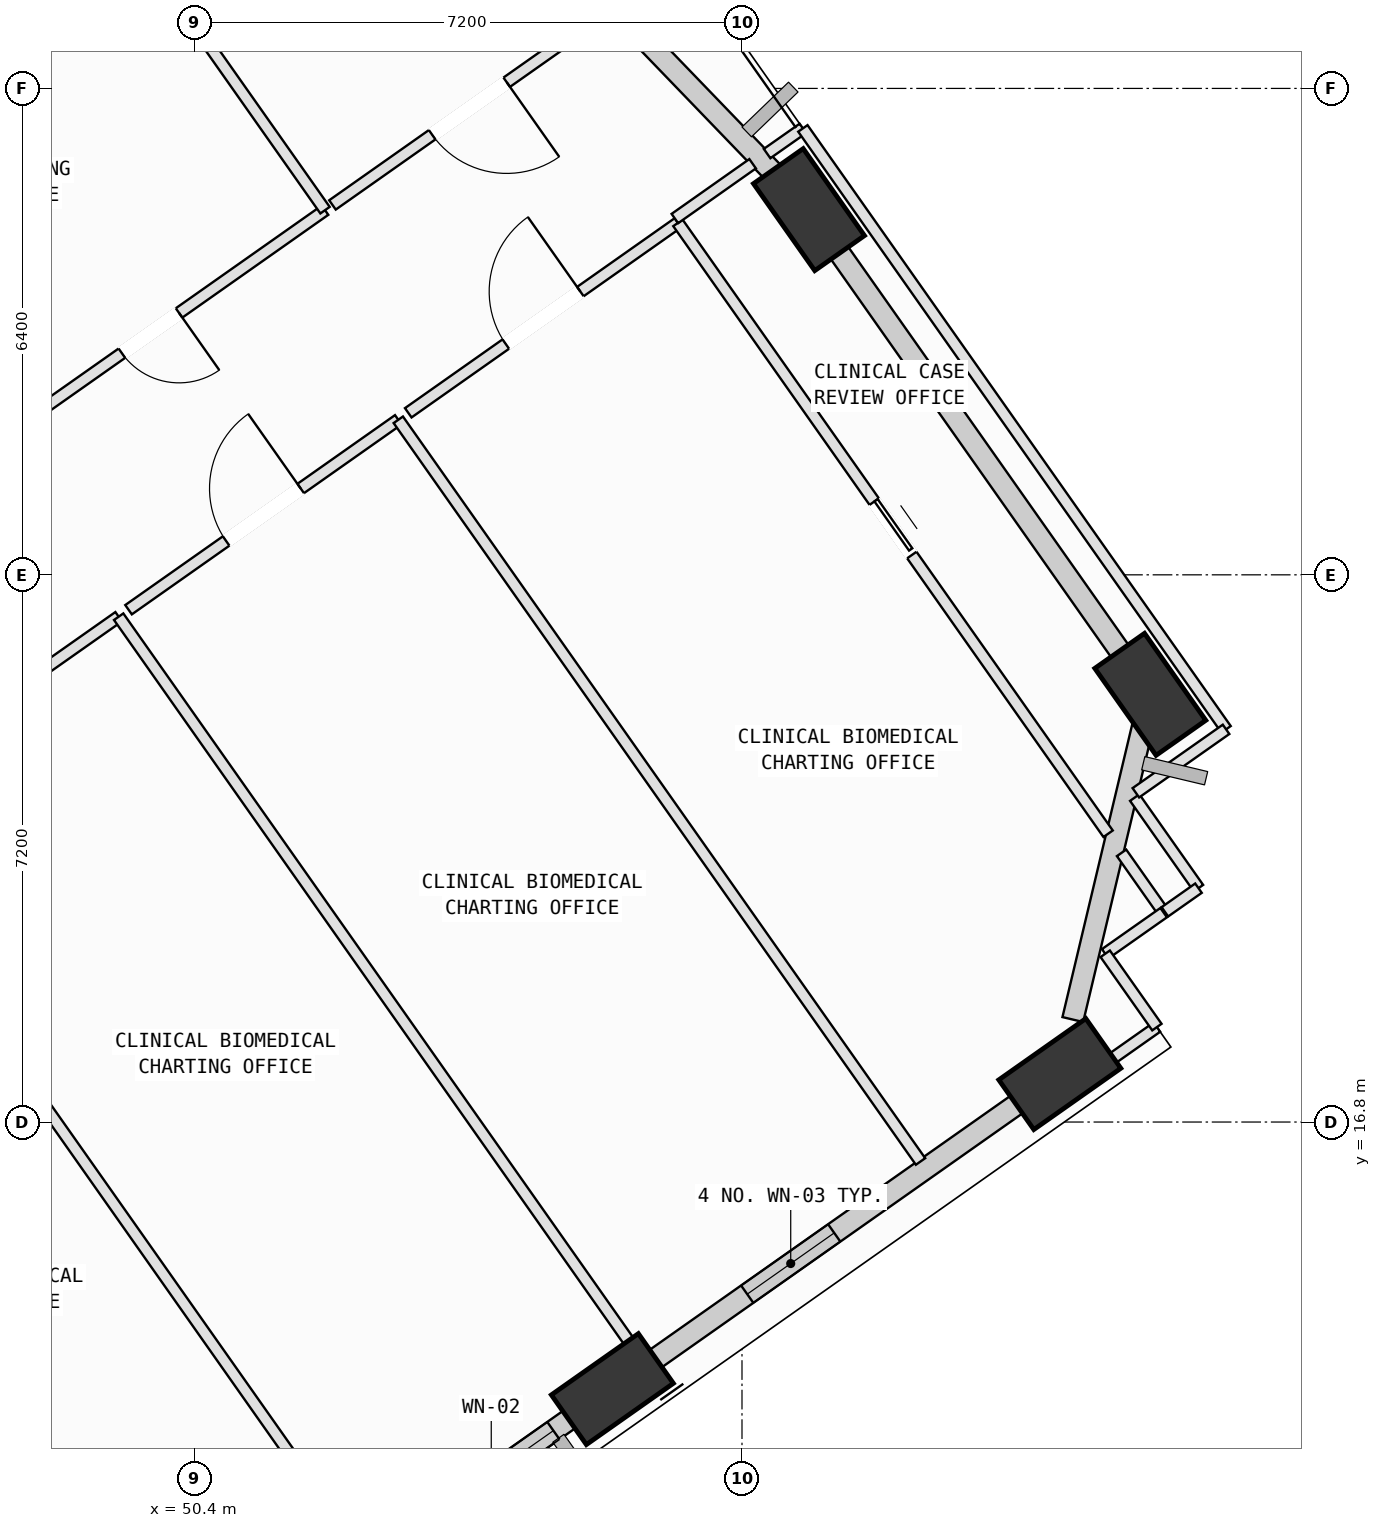
"""IFC4 building model, lengths in metres.
Left out: names, types, materials, properties, quantities, classifications, styles, units other than length and angle.
Written with IfcOpenShell. Run it as: python <this file> out.ifc"""

import sys

from ifc_helpers import new_model, si_unit, direction, frame, frame_2d, origin, origin_2d, place, context, subcontext, project, spatial, rectangle, extrude, element, fill, save


model = new_model("IFC4")
c1 = context("Model", 3, precision=1e-05, world=origin(), true_north=direction((0.0, 1.0)))
c2 = subcontext(c1, "Body", "Model", "MODEL_VIEW")
j1 = project(units=[si_unit("LENGTHUNIT", "METRE"), si_unit("PLANEANGLEUNIT", "RADIAN")], contexts=[c1])
p1 = place(None, origin())
s1 = spatial("IfcSite", under=j1, at=p1, CompositionType="ELEMENT")
p2 = place(p1, origin())
s2 = spatial("IfcBuilding", under=s1, at=p2, CompositionType="ELEMENT")
p3 = place(p2, frame((0.0, 0.0, 173.8)))
s3 = spatial("IfcBuildingStorey", under=s2, at=p3, CompositionType="ELEMENT", Elevation=173.8)
p4 = place(p3, frame((55.895, 13.286, 0.002), z_axis=(0.046726970601, 0.092299438677, 0.994634306586), x_axis=(-0.988133036877, -0.141582839923, 0.059560061042)))
e1 = element("IfcColumn", 1, at=p4, inside=s3, PredefinedType="COLUMN", context=c2, shape_type="SweptSolid", body=[
    extrude(rectangle(XDim=1.4, YDim=0.8, at=origin_2d()), origin(), (0.0, 0.0, 1.0), 4.018),
])
p5 = place(p3, frame((61.781, 17.431, 0.002), z_axis=(0.029354934383, 0.116206723713, 0.992791158901), x_axis=(-0.932731987806, -0.353906045006, 0.069003987069)))
e2 = element("IfcColumn", 2, at=p5, inside=s3, PredefinedType="COLUMN", context=c2, shape_type="SweptSolid", body=[
    extrude(rectangle(XDim=1.4, YDim=0.8, at=origin_2d()), origin(), (0.0, 0.0, 1.0), 4.025),
])
p6 = place(p3, frame((62.972, 22.427, 0.002), z_axis=(0.00879280202, 0.120976827791, 0.992616388022), x_axis=(0.515370311982, -0.851209314245, 0.099177340502)))
e3 = element("IfcColumn", 3, at=p6, inside=s3, PredefinedType="COLUMN", context=c2, shape_type="SweptSolid", body=[
    extrude(rectangle(XDim=1.4, YDim=0.8, at=origin_2d()), origin(), (0.0, 0.0, 1.0), 4.026),
])
p7 = place(p3, frame((58.481, 28.805, 0.002), z_axis=(-0.017377477676, 0.102442053714, 0.994587175114), x_axis=(0.703616146973, -0.705483127216, 0.084958077495)))
e4 = element("IfcColumn", 4, at=p7, inside=s3, PredefinedType="COLUMN", context=c2, shape_type="SweptSolid", body=[
    extrude(rectangle(XDim=1.4, YDim=0.8, at=origin_2d()), origin(), (0.0, 0.0, 1.0), 4.018),
])
p8 = place(p3, frame((55.647, 13.111, 0.0), z_axis=(0.0, 0.0, 1.0), x_axis=(-0.817651715205, -0.575713186077, 0.0)))
e5 = element("IfcWall", 5, at=p8, inside=s3, PredefinedType="SOLIDWALL", context=c2, shape_type="SweptSolid", body=[
    extrude(rectangle(XDim=6.218, YDim=0.28, at=frame_2d((3.109, 0.0))), origin(), (0.0, 0.0, 1.0), 3.265),
])
p9 = place(p8, frame((0.646, 0.0, 0.75)))
e6 = element("IfcOpeningElement", 6, at=p9, cuts=e5, PredefinedType="OPENING", context=c2, shape_type="SweptSolid", body=[
    extrude(rectangle(XDim=2.0, YDim=1.95, at=frame_2d((1.0, 0.975))), frame((0.0, 0.15, 0.0), z_axis=(0.0, -1.0, 0.0), x_axis=(1.0, 0.0, 0.0)), (0.0, 0.0, 1.0), 0.3),
])
p10 = place(p3, frame((61.546, 17.265, 0.0), z_axis=(0.0, 0.0, 1.0), x_axis=(-0.817633903832, -0.575738481695, 0.0)))
e7 = element("IfcWall", 7, at=p10, inside=s3, PredefinedType="SOLIDWALL", context=c2, shape_type="SweptSolid", body=[
    extrude(rectangle(XDim=6.242, YDim=0.28, at=frame_2d((3.121, 0.0))), origin(), (0.0, 0.0, 1.0), 3.265),
])
p11 = place(p10, frame((3.343, 0.0, 0.75)))
e8 = element("IfcOpeningElement", 8, at=p11, cuts=e7, PredefinedType="OPENING", context=c2, shape_type="SweptSolid", body=[
    extrude(rectangle(XDim=1.4, YDim=1.85, at=frame_2d((0.7, 0.925))), frame((0.0, 0.15, 0.0), z_axis=(0.0, -1.0, 0.0), x_axis=(1.0, 0.0, 0.0)), (0.0, 0.0, 1.0), 0.3),
])
p12 = place(p3, frame((62.913, 22.181, 0.0), z_axis=(0.0, 0.0, 1.0), x_axis=(-0.231822241408, -0.972758165419, 0.0)))
e9 = element("IfcWall", 9, at=p12, inside=s3, PredefinedType="SOLIDWALL", context=c2, shape_type="SweptSolid", body=[
    extrude(rectangle(XDim=4.145, YDim=0.28, at=frame_2d((2.073, 0.0))), origin(), (0.0, 0.0, 1.0), 3.265),
])
p13 = place(p3, frame((58.654, 28.56, 0.0), z_axis=(0.0, 0.0, 1.0), x_axis=(0.575721488914, -0.817645869067, 0.0)))
e10 = element("IfcWall", 10, at=p13, inside=s3, PredefinedType="SOLIDWALL", context=c2, shape_type="SweptSolid", body=[
    extrude(rectangle(XDim=6.84, YDim=0.28, at=frame_2d((3.42, 0.0))), origin(), (0.0, 0.0, 1.0), 3.265),
])
p14 = place(p3, frame((51.895, 35.64, 0.0), z_axis=(0.0, 0.0, 1.0), x_axis=(0.693919284299, -0.720052794508, 0.0)))
e11 = element("IfcWall", 11, at=p14, inside=s3, PredefinedType="SOLIDWALL", context=c2, shape_type="SweptSolid", body=[
    extrude(rectangle(XDim=8.838, YDim=0.28, at=frame_2d((4.419, 0.0))), origin(), (0.0, 0.0, 1.0), 3.265),
])
p15 = place(p3, frame((42.04, 18.268, 0.0), z_axis=(0.0, 0.0, 1.0), x_axis=(0.575682896217, -0.817673041627, 0.0)))
e12 = element("IfcWall", 12, at=p15, inside=s3, PredefinedType="PARTITIONING", context=c2, shape_type="SweptSolid", body=[
    extrude(rectangle(XDim=11.935, YDim=0.15, at=frame_2d((5.968, 0.0))), origin(), (0.0, 0.0, 1.0), 3.78),
])
p16 = place(p3, frame((45.719, 20.858, 0.0), z_axis=(0.0, 0.0, 1.0), x_axis=(0.575744719848, -0.817629511189, 0.0)))
e13 = element("IfcWall", 13, at=p16, inside=s3, PredefinedType="PARTITIONING", context=c2, shape_type="SweptSolid", body=[
    extrude(rectangle(XDim=11.934, YDim=0.15, at=frame_2d((5.967, 0.0))), origin(), (0.0, 0.0, 1.0), 3.78),
])
p17 = place(p3, frame((45.85, 20.951, 0.0), z_axis=(0.0, 0.0, 1.0), x_axis=(0.817727963856, 0.575604879346, 0.0)))
e14 = element("IfcWall", 14, at=p17, inside=s3, PredefinedType="PARTITIONING", context=c2, shape_type="SweptSolid", body=[
    extrude(rectangle(XDim=4.34, YDim=0.15, at=frame_2d((2.17, 0.0))), origin(), (0.0, 0.0, 1.0), 3.78),
])
p18 = place(p17, frame((1.57, 0.0, 0.0)))
e15 = element("IfcOpeningElement", 15, at=p18, cuts=e14, PredefinedType="OPENING", context=c2, shape_type="SweptSolid", body=[
    extrude(rectangle(XDim=1.2, YDim=2.15, at=frame_2d((0.6, 1.075))), frame((0.0, 0.085, 0.0), z_axis=(0.0, -1.0, 0.0), x_axis=(1.0, 0.0, 0.0)), (0.0, 0.0, 1.0), 0.17),
])
p19 = place(p3, frame((49.399, 23.449, 0.0), z_axis=(0.0, 0.0, 1.0), x_axis=(0.575704672979, -0.817657709259, 0.0)))
e16 = element("IfcWall", 16, at=p19, inside=s3, PredefinedType="PARTITIONING", context=c2, shape_type="SweptSolid", body=[
    extrude(rectangle(XDim=12.279, YDim=0.15, at=frame_2d((6.14, 0.0))), origin(), (0.0, 0.0, 1.0), 3.78),
])
p20 = place(p3, frame((56.468, 13.409, 0.0), z_axis=(0.0, 0.0, 1.0), x_axis=(-0.817786213284, -0.575522118917, 0.0)))
e17 = element("IfcWall", 17, at=p20, inside=s3, PredefinedType="PARTITIONING", context=c2, shape_type="SweptSolid", body=[
    extrude(rectangle(XDim=0.843, YDim=0.15, at=frame_2d((0.421, 0.0))), origin(), (0.0, 0.0, 1.0), 3.265),
])
p21 = place(p3, frame((49.529, 23.541, 0.0), z_axis=(0.0, 0.0, 1.0), x_axis=(0.81762204879, 0.575755317241, 0.0)))
e18 = element("IfcWall", 18, at=p21, inside=s3, PredefinedType="PARTITIONING", context=c2, shape_type="SweptSolid", body=[
    extrude(rectangle(XDim=4.34, YDim=0.15, at=frame_2d((2.17, 0.0))), origin(), (0.0, 0.0, 1.0), 3.065),
])
p22 = place(p21, frame((1.57, 0.0, 0.0)))
e19 = element("IfcOpeningElement", 19, at=p22, cuts=e18, PredefinedType="OPENING", context=c2, shape_type="SweptSolid", body=[
    extrude(rectangle(XDim=1.2, YDim=2.15, at=frame_2d((0.6, 1.075))), frame((0.0, 0.085, 0.0), z_axis=(0.0, -1.0, 0.0), x_axis=(1.0, 0.0, 0.0)), (0.0, 0.0, 1.0), 0.17),
])
p23 = place(p3, frame((53.078, 26.04, 0.0), z_axis=(0.0, 0.0, 1.0), x_axis=(0.575696572392, -0.817663412742, 0.0)))
e20 = element("IfcWall", 20, at=p23, inside=s3, PredefinedType="PARTITIONING", context=c2, shape_type="SweptSolid", body=[
    extrude(rectangle(XDim=11.935, YDim=0.15, at=frame_2d((5.968, 0.0))), origin(), (0.0, 0.0, 1.0), 3.78),
])
p24 = place(p3, frame((63.059, 18.049, 0.0), z_axis=(0.0, 0.0, 1.0), x_axis=(-0.817536593358, -0.575876652176, 0.0)))
e21 = element("IfcWall", 21, at=p24, inside=s3, PredefinedType="PARTITIONING", context=c2, shape_type="SweptSolid", body=[
    extrude(rectangle(XDim=1.688, YDim=0.15, at=frame_2d((0.844, 0.0))), origin(), (0.0, 0.0, 1.0), 3.78),
])
p25 = place(p3, frame((53.209, 26.132, 0.0), z_axis=(0.0, 0.0, 1.0), x_axis=(0.817566099481, 0.575834761872, 0.0)))
e22 = element("IfcWall", 22, at=p25, inside=s3, PredefinedType="PARTITIONING", context=c2, shape_type="SweptSolid", body=[
    extrude(rectangle(XDim=4.34, YDim=0.15, at=frame_2d((2.17, 0.0))), origin(), (0.0, 0.0, 1.0), 3.065),
])
p26 = place(p25, frame((1.57, 0.0, 0.0)))
e23 = element("IfcOpeningElement", 23, at=p26, cuts=e22, PredefinedType="OPENING", context=c2, shape_type="SweptSolid", body=[
    extrude(rectangle(XDim=1.2, YDim=2.15, at=frame_2d((0.6, 1.075))), frame((0.0, 0.085, 0.0), z_axis=(0.0, -1.0, 0.0), x_axis=(1.0, 0.0, 0.0)), (0.0, 0.0, 1.0), 0.17),
])
p27 = place(p3, frame((56.757, 28.631, 0.0), z_axis=(0.0, 0.0, 1.0), x_axis=(0.575730217861, -0.817639722764, 0.0)))
e24 = element("IfcWall", 24, at=p27, inside=s3, PredefinedType="PARTITIONING", context=c2, shape_type="SweptSolid", body=[
    extrude(rectangle(XDim=9.831, YDim=0.15, at=frame_2d((4.916, 0.0))), origin(), (0.0, 0.0, 1.0), 3.78),
])
p28 = place(p27, frame((4.485, 0.0, 0.0)))
e25 = element("IfcOpeningElement", 25, at=p28, cuts=e24, PredefinedType="OPENING", context=c2, shape_type="SweptSolid", body=[
    extrude(rectangle(XDim=0.86, YDim=2.06, at=frame_2d((0.43, 1.03))), frame((0.0, 0.085, 0.0), z_axis=(0.0, -1.0, 0.0), x_axis=(1.0, 0.0, 0.0)), (0.0, 0.0, 1.0), 0.17),
])
p29 = place(p3, frame((62.594, 20.342, 0.0), z_axis=(0.0, 0.0, 1.0), x_axis=(0.575537387279, -0.817775467866, 0.0)))
e26 = element("IfcWall", 26, at=p29, inside=s3, PredefinedType="PARTITIONING", context=c2, shape_type="SweptSolid", body=[
    extrude(rectangle(XDim=0.962, YDim=0.15, at=frame_2d((0.481, 0.0))), origin(), (0.0, 0.0, 1.0), 3.78),
])
p30 = place(p3, frame((63.148, 19.555, 0.0), z_axis=(0.0, 0.0, 1.0), x_axis=(-0.817887878313, -0.57537763122, 0.0)))
e27 = element("IfcWall", 27, at=p30, inside=s3, PredefinedType="PARTITIONING", context=c2, shape_type="SweptSolid", body=[
    extrude(rectangle(XDim=0.94, YDim=0.15, at=frame_2d((0.47, 0.0))), origin(), (0.0, 0.0, 1.0), 3.78),
])
p31 = place(p3, frame((62.379, 19.014, 0.0), z_axis=(0.0, 0.0, 1.0), x_axis=(0.576179669195, -0.817323062691, 0.0)))
e28 = element("IfcWall", 28, at=p31, inside=s3, PredefinedType="PARTITIONING", context=c2, shape_type="SweptSolid", body=[
    extrude(rectangle(XDim=1.18, YDim=0.15, at=frame_2d((0.59, 0.0))), origin(), (0.0, 0.0, 1.0), 3.78),
])
p32 = place(p3, frame((52.114, 28.798, 0.0), z_axis=(0.0, 0.0, 1.0), x_axis=(-0.817638200952, -0.5757323791, 0.0)))
e29 = element("IfcWall", 29, at=p32, inside=s3, PredefinedType="PARTITIONING", context=c2, shape_type="SweptSolid", body=[
    extrude(rectangle(XDim=5.617, YDim=0.15, at=frame_2d((2.809, 0.0))), origin(), (0.0, 0.0, 1.0), 3.78),
])
p33 = place(p32, frame((2.349, 0.0, 0.0)))
e30 = element("IfcOpeningElement", 30, at=p33, cuts=e29, PredefinedType="OPENING", context=c2, shape_type="SweptSolid", body=[
    extrude(rectangle(XDim=0.92, YDim=2.1, at=frame_2d((0.46, 1.05))), frame((0.0, 0.085, 0.0), z_axis=(0.0, -1.0, 0.0), x_axis=(1.0, 0.0, 0.0)), (0.0, 0.0, 1.0), 0.17),
])
p34 = place(p3, frame((48.703, 33.642, 0.0), z_axis=(0.0, 0.0, 1.0), x_axis=(0.575763875757, -0.817616021965, 0.0)))
e31 = element("IfcWall", 31, at=p34, inside=s3, PredefinedType="PARTITIONING", context=c2, shape_type="SweptSolid", body=[
    extrude(rectangle(XDim=5.925, YDim=0.15, at=frame_2d((2.962, 0.0))), origin(), (0.0, 0.0, 1.0), 3.78),
])
p35 = place(p3, frame((55.816, 31.405, 0.0), z_axis=(0.0, 0.0, 1.0), x_axis=(-0.817599763691, -0.575786962697, 0.0)))
e32 = element("IfcWall", 32, at=p35, inside=s3, PredefinedType="PARTITIONING", context=c2, shape_type="SweptSolid", body=[
    extrude(rectangle(XDim=4.408, YDim=0.15, at=frame_2d((2.204, 0.0))), origin(), (0.0, 0.0, 1.0), 3.78),
])
p36 = place(p35, frame((1.604, 0.0, 0.0)))
e33 = element("IfcOpeningElement", 33, at=p36, cuts=e32, PredefinedType="OPENING", context=c2, shape_type="SweptSolid", body=[
    extrude(rectangle(XDim=1.2, YDim=2.15, at=frame_2d((0.6, 1.075))), frame((0.0, 0.085, 0.0), z_axis=(0.0, -1.0, 0.0), x_axis=(1.0, 0.0, 0.0)), (0.0, 0.0, 1.0), 0.17),
])
p37 = place(p3, frame((62.767, 21.069, 0.0), z_axis=(0.0, 0.0, 1.0), x_axis=(0.575472662643, -0.817821016207, 0.0)))
e34 = element("IfcWall", 34, at=p37, inside=s3, PredefinedType="PARTITIONING", context=c2, shape_type="SweptSolid", body=[
    extrude(rectangle(XDim=1.458, YDim=0.15, at=frame_2d((0.729, 0.0))), origin(), (0.0, 0.0, 1.0), 3.78),
])
p38 = place(p3, frame((63.606, 19.877, 0.0), z_axis=(0.0, 0.0, 1.0), x_axis=(-0.817743412221, -0.575582932138, 0.0)))
e35 = element("IfcWall", 35, at=p38, inside=s3, PredefinedType="PARTITIONING", context=c2, shape_type="SweptSolid", body=[
    extrude(rectangle(XDim=0.54, YDim=0.15, at=frame_2d((0.27, 0.0))), origin(), (0.0, 0.0, 1.0), 3.78),
])
p39 = place(p3, frame((56.717, 28.688, 0.0), z_axis=(0.0, 0.0, 1.0), x_axis=(0.817394747744, 0.576077968995, 0.0)))
e36 = element("IfcWall", 36, at=p39, inside=s3, PredefinedType="PARTITIONING", context=c2, shape_type="SweptSolid", body=[
    extrude(rectangle(XDim=1.251, YDim=0.15, at=frame_2d((0.626, 0.0))), origin(), (0.0, 0.0, 1.0), 3.065),
])
p40 = place(p3, frame((57.93, 29.543, 0.0), z_axis=(0.0, 0.0, 1.0), x_axis=(0.818094628875, 0.575083627141, 0.0)))
e37 = element("IfcWall", 37, at=p40, inside=s3, PredefinedType="PARTITIONING", context=c2, shape_type="SweptSolid", body=[
    extrude(rectangle(XDim=0.576, YDim=0.15, at=frame_2d((0.288, 0.0))), origin(), (0.0, 0.0, 1.0), 3.78),
])
p41 = place(p3, frame((58.401, 29.874, 0.0), z_axis=(0.0, 0.0, 1.0), x_axis=(0.575766021758, -0.81761451075, 0.0)))
e38 = element("IfcWall", 38, at=p41, inside=s3, PredefinedType="PARTITIONING", context=c2, shape_type="SweptSolid", body=[
    extrude(rectangle(XDim=9.671, YDim=0.15, at=frame_2d((4.835, 0.0))), origin(), (0.0, 0.0, 1.0), 3.265),
])
p42 = place(p3, frame((63.969, 21.967, 0.0), z_axis=(0.0, 0.0, 1.0), x_axis=(-0.817917834815, -0.575335046291, 0.0)))
e39 = element("IfcWall", 39, at=p42, inside=s3, PredefinedType="PARTITIONING", context=c2, shape_type="SweptSolid", body=[
    extrude(rectangle(XDim=1.451, YDim=0.15, at=frame_2d((0.726, 0.0))), origin(), (0.0, 0.0, 1.0), 3.78),
])
p43 = place(p9, origin())
e40 = element("IfcWindow", 40, at=p43, inside=s3, PartitioningType="SINGLE_PANEL", PredefinedType="WINDOW", context=c2, shape_type="SweptSolid", body=[
    extrude(rectangle(XDim=2.0, YDim=1.95, at=frame_2d((1.0, 0.975))), frame((0.0, 0.03, 0.0), z_axis=(0.0, -1.0, 0.0), x_axis=(1.0, 0.0, 0.0)), (0.0, 0.0, 1.0), 0.06),
])
fill(e6, e40)
p44 = place(p11, origin())
e41 = element("IfcWindow", 41, at=p44, inside=s3, PartitioningType="SINGLE_PANEL", PredefinedType="WINDOW", context=c2, shape_type="SweptSolid", body=[
    extrude(rectangle(XDim=1.4, YDim=1.85, at=frame_2d((0.7, 0.925))), frame((0.0, 0.03, 0.0), z_axis=(0.0, -1.0, 0.0), x_axis=(1.0, 0.0, 0.0)), (0.0, 0.0, 1.0), 0.06),
])
fill(e8, e41)
p45 = place(p22, origin())
e42 = element("IfcDoor", 42, at=p45, inside=s3, OperationType="SINGLE_SWING_RIGHT", PredefinedType="DOOR", context=c2, shape_type="SweptSolid", body=[
    extrude(rectangle(XDim=1.2, YDim=2.15, at=frame_2d((0.6, 1.075))), frame((0.0, 0.025, 0.0), z_axis=(0.0, -1.0, 0.0), x_axis=(1.0, 0.0, 0.0)), (0.0, 0.0, 1.0), 0.05),
])
fill(e19, e42)
p46 = place(p26, origin())
e43 = element("IfcDoor", 43, at=p46, inside=s3, OperationType="SINGLE_SWING_RIGHT", PredefinedType="DOOR", context=c2, shape_type="SweptSolid", body=[
    extrude(rectangle(XDim=1.2, YDim=2.15, at=frame_2d((0.6, 1.075))), frame((0.0, 0.025, 0.0), z_axis=(0.0, -1.0, 0.0), x_axis=(1.0, 0.0, 0.0)), (0.0, 0.0, 1.0), 0.05),
])
fill(e23, e43)
p47 = place(p33, origin())
e44 = element("IfcDoor", 44, at=p47, inside=s3, OperationType="SINGLE_SWING_LEFT", PredefinedType="DOOR", context=c2, shape_type="SweptSolid", body=[
    extrude(rectangle(XDim=0.92, YDim=2.1, at=frame_2d((0.46, 1.05))), frame((0.0, 0.025, 0.0), z_axis=(0.0, -1.0, 0.0), x_axis=(1.0, 0.0, 0.0)), (0.0, 0.0, 1.0), 0.05),
])
fill(e30, e44)
p48 = place(p36, origin())
e45 = element("IfcDoor", 45, at=p48, inside=s3, OperationType="SINGLE_SWING_LEFT", PredefinedType="DOOR", context=c2, shape_type="SweptSolid", body=[
    extrude(rectangle(XDim=1.2, YDim=2.15, at=frame_2d((0.6, 1.075))), frame((0.0, 0.025, 0.0), z_axis=(0.0, -1.0, 0.0), x_axis=(1.0, 0.0, 0.0)), (0.0, 0.0, 1.0), 0.05),
])
fill(e33, e45)
p49 = place(p28, origin())
e46 = element("IfcDoor", 46, at=p49, inside=s3, OperationType="SLIDING_TO_LEFT", PredefinedType="DOOR", context=c2, shape_type="SweptSolid", body=[
    extrude(rectangle(XDim=0.86, YDim=2.06, at=frame_2d((0.43, 1.03))), frame((0.0, 0.025, 0.0), z_axis=(0.0, -1.0, 0.0), x_axis=(1.0, 0.0, 0.0)), (0.0, 0.0, 1.0), 0.05),
])
fill(e25, e46)
save(model, sys.argv[1])
